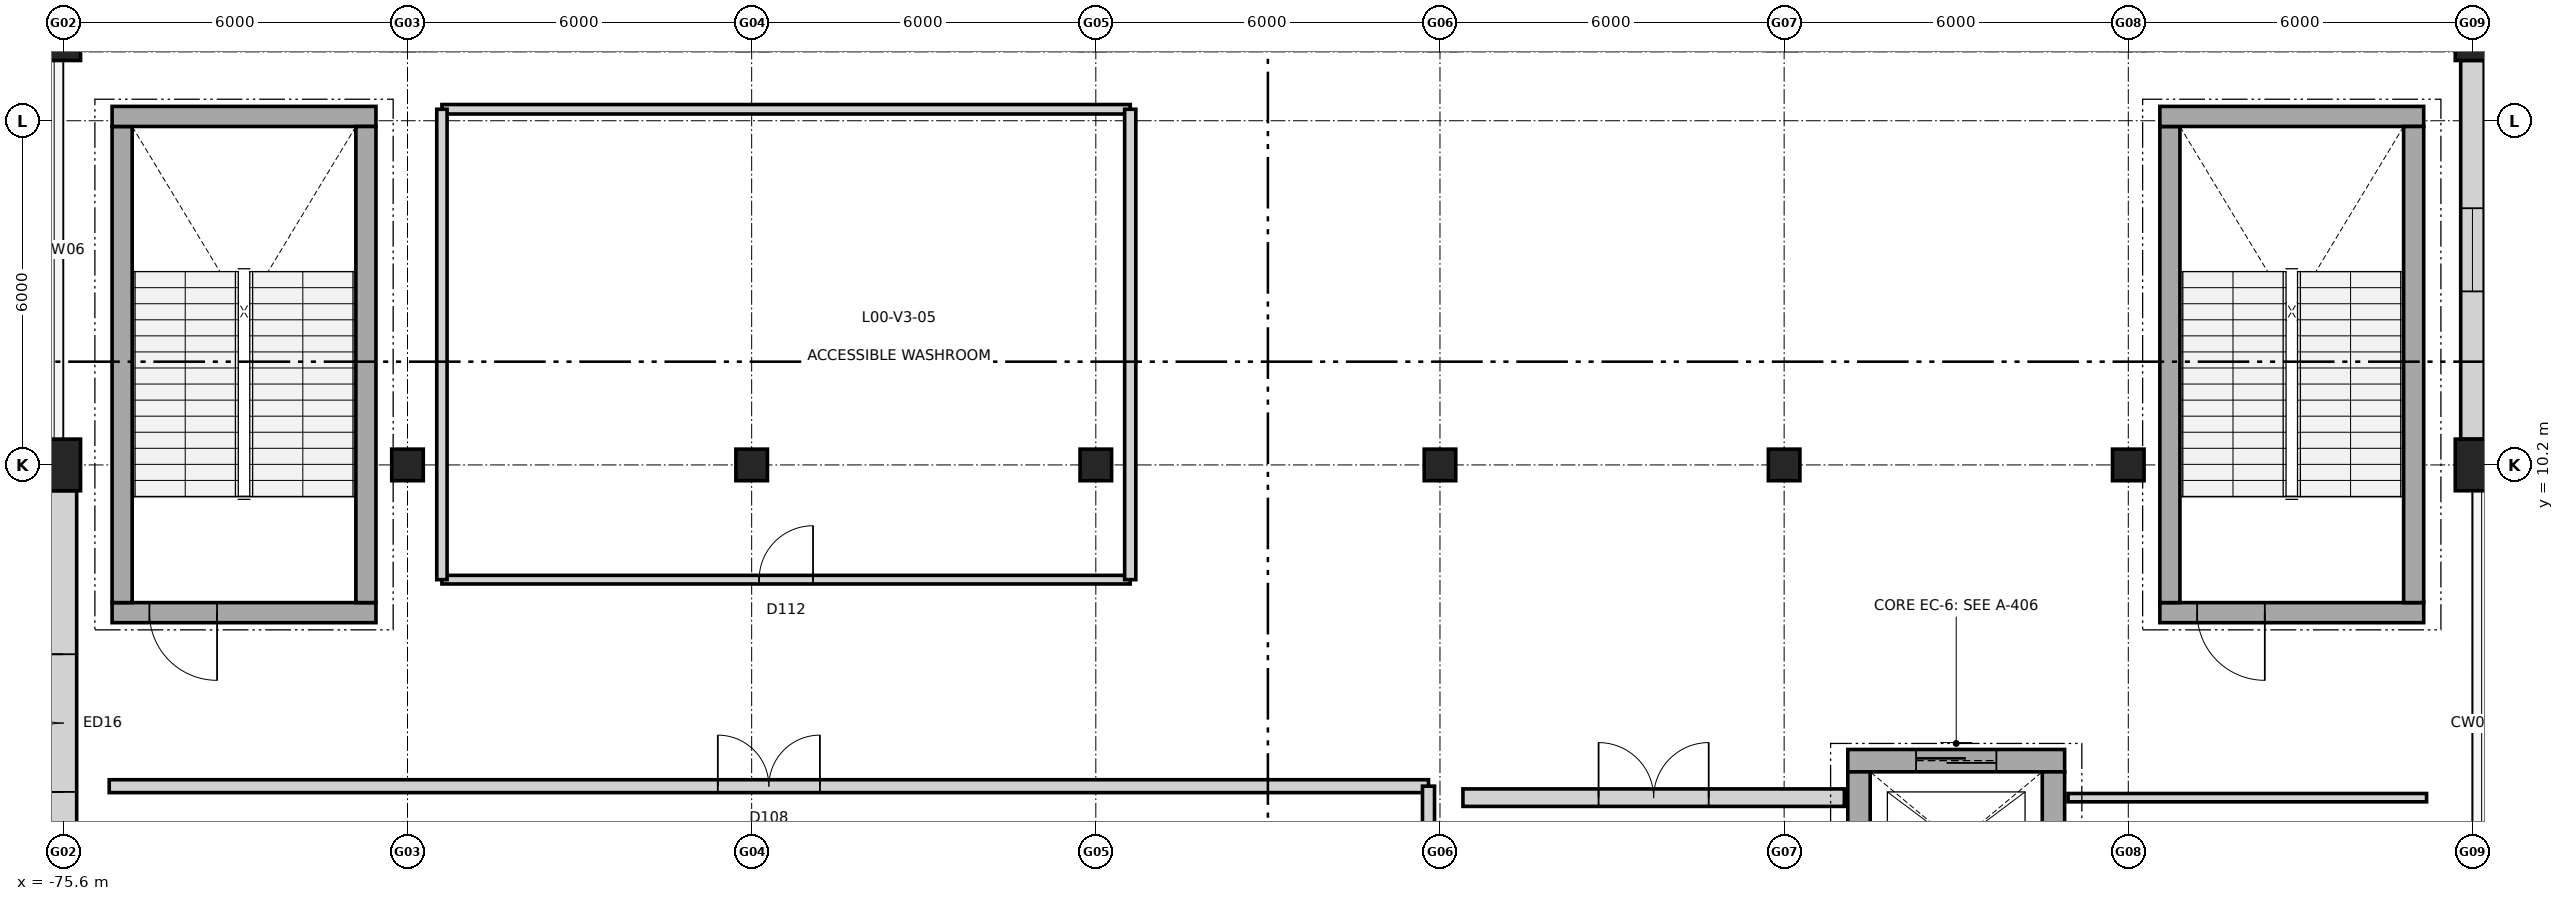
"""IFC4 building model, lengths in metres.
Left out: names, types, materials, properties, quantities, classifications, styles, units other than length and angle.
Written with IfcOpenShell. Run it as: python <this file> out.ifc"""

import sys

from ifc_helpers import new_model, si_unit, direction, frame, frame_2d, origin, origin_2d, place, context, subcontext, project, spatial, rectangle, extrude, element, fill, save


model = new_model("IFC4")
c1 = context("Model", 3, precision=1e-05, world=origin(), true_north=direction((0.0, 1.0)))
c2 = subcontext(c1, "Body", "Model", "MODEL_VIEW")
j1 = project(units=[si_unit("LENGTHUNIT", "METRE"), si_unit("PLANEANGLEUNIT", "RADIAN")], contexts=[c1])
p1 = place(None, origin())
s1 = spatial("IfcSite", under=j1, at=p1, CompositionType="ELEMENT")
p2 = place(p1, origin())
s2 = spatial("IfcBuilding", under=s1, at=p2, CompositionType="ELEMENT")
p3 = place(p2, origin())
s3 = spatial("IfcBuildingStorey", under=s2, at=p3, CompositionType="ELEMENT", Elevation=0.0)
for number, where, z_axis, x_axis in (
    (1, (-75.6, 10.2, 0.0), (0.0, 0.0, 1.0), (1.0, 0.0, 0.0)),
    (2, (-75.6, 17.7, 0.0), (0.0, 0.0, 1.0), (1.0, 0.0, 0.0)),
):
    element("IfcColumn", number, at=place(p3, frame(where, z_axis=z_axis, x_axis=x_axis)), inside=s3, PredefinedType="COLUMN", context=c2, shape_type="SweptSolid", body=[
        extrude(rectangle(XDim=0.6, YDim=0.9, at=origin_2d()), origin(), (0.0, 0.0, 1.0), 5.4),
    ])
for number, where, z_axis, x_axis in (
    (3, (-69.6, 10.2, 0.0), (0.0, 0.0, 1.0), (1.0, 0.0, 0.0)),
    (4, (-63.6, 10.2, 0.0), (0.0, 0.0, 1.0), (1.0, 0.0, 0.0)),
    (5, (-57.6, 10.2, 0.0), (0.0, 0.0, 1.0), (1.0, 0.0, 0.0)),
    (6, (-51.6, 10.2, 0.0), (0.0, 0.0, 1.0), (1.0, 0.0, 0.0)),
    (7, (-45.6, 10.2, 0.0), (0.0, 0.0, 1.0), (1.0, 0.0, 0.0)),
    (8, (-39.6, 10.2, 0.0), (0.0, 0.0, 1.0), (1.0, 0.0, 0.0)),
):
    element("IfcColumn", number, at=place(p3, frame(where, z_axis=z_axis, x_axis=x_axis)), inside=s3, PredefinedType="COLUMN", context=c2, shape_type="SweptSolid", body=[
        extrude(rectangle(XDim=0.55, YDim=0.55, at=origin_2d()), origin(), (0.0, 0.0, 1.0), 5.4),
    ])
for number, where, z_axis, x_axis in (
    (9, (-33.6, 10.2, 0.0), (0.0, 0.0, 1.0), (1.0, 0.0, 0.0)),
    (10, (-33.6, 17.7, 0.0), (0.0, 0.0, 1.0), (1.0, 0.0, 0.0)),
):
    element("IfcColumn", number, at=place(p3, frame(where, z_axis=z_axis, x_axis=x_axis)), inside=s3, PredefinedType="COLUMN", context=c2, shape_type="SweptSolid", body=[
        extrude(rectangle(XDim=0.6, YDim=0.9, at=origin_2d()), origin(), (0.0, 0.0, 1.0), 5.4),
    ])
p4 = place(p3, frame((-75.6, 1.648, 0.0), z_axis=(0.0, 0.0, 1.0), x_axis=(0.0, 1.0, 0.0)))
e11 = element("IfcWall", 11, at=p4, inside=s3, PredefinedType="STANDARD", context=c2, shape_type="SweptSolid", body=[
    extrude(rectangle(XDim=8.104, YDim=0.465, at=frame_2d((4.052, 0.0))), origin(), (0.0, 0.0, 1.0), 4.404),
])
p5 = place(p4, frame((2.852, 0.0, 0.0)))
e12 = element("IfcOpeningElement", 12, at=p5, cuts=e11, PredefinedType="OPENING", context=c2, shape_type="SweptSolid", body=[
    extrude(rectangle(XDim=2.4, YDim=2.5, at=frame_2d((1.2, 1.25))), frame((0.0, 0.242, 0.0), z_axis=(0.0, -1.0, 0.0), x_axis=(1.0, 0.0, 0.0)), (0.0, 0.0, 1.0), 0.485),
])
p6 = place(p3, frame((-33.6, 17.252, 0.0), z_axis=(0.0, 0.0, 1.0), x_axis=(0.0, -1.0, 0.0)))
e13 = element("IfcWall", 13, at=p6, inside=s3, PredefinedType="STANDARD", context=c2, shape_type="SweptSolid", body=[
    extrude(rectangle(XDim=6.604, YDim=0.41, at=frame_2d((3.302, 0.0))), origin(), (0.0, 0.0, 1.0), 4.404),
])
p7 = place(p6, frame((2.577, 0.0, 0.85)))
e14 = element("IfcOpeningElement", 14, at=p7, cuts=e13, PredefinedType="OPENING", context=c2, shape_type="SweptSolid", body=[
    extrude(rectangle(XDim=1.45, YDim=2.1, at=frame_2d((0.725, 1.05))), frame((0.0, 0.215, 0.0), z_axis=(0.0, -1.0, 0.0), x_axis=(1.0, 0.0, 0.0)), (0.0, 0.0, 1.0), 0.43),
])
p8 = place(p3, frame((-70.15, 7.625, 0.0), z_axis=(0.0, 0.0, 1.0), x_axis=(-1.0, 0.0, 0.0)))
e15 = element("IfcWall", 15, at=p8, inside=s3, PredefinedType="SHEAR", context=c2, shape_type="SweptSolid", body=[
    extrude(rectangle(XDim=4.6, YDim=0.35, at=frame_2d((2.3, 0.0))), origin(), (0.0, 0.0, 1.0), 5.4),
])
p9 = place(p8, frame((2.77, 0.0, 0.0)))
e16 = element("IfcOpeningElement", 16, at=p9, cuts=e15, PredefinedType="OPENING", context=c2, shape_type="SweptSolid", body=[
    extrude(rectangle(XDim=1.18, YDim=2.15, at=frame_2d((0.59, 1.075))), frame((0.0, 0.185, 0.0), z_axis=(0.0, -1.0, 0.0), x_axis=(1.0, 0.0, 0.0)), (0.0, 0.0, 1.0), 0.37),
])
p10 = place(p3, frame((-74.575, 7.8, 0.0), z_axis=(0.0, 0.0, 1.0), x_axis=(0.0, 1.0, 0.0)))
e17 = element("IfcWall", 17, at=p10, inside=s3, PredefinedType="SHEAR", context=c2, shape_type="SweptSolid", body=[
    extrude(rectangle(XDim=8.3, YDim=0.35, at=frame_2d((4.15, 0.0))), origin(), (0.0, 0.0, 1.0), 5.4),
])
p11 = place(p3, frame((-74.75, 16.275, 0.0), z_axis=(0.0, 0.0, 1.0), x_axis=(1.0, 0.0, 0.0)))
e18 = element("IfcWall", 18, at=p11, inside=s3, PredefinedType="SHEAR", context=c2, shape_type="SweptSolid", body=[
    extrude(rectangle(XDim=4.6, YDim=0.35, at=frame_2d((2.3, 0.0))), origin(), (0.0, 0.0, 1.0), 5.4),
])
p12 = place(p3, frame((-70.325, 16.1, 0.0), z_axis=(0.0, 0.0, 1.0), x_axis=(0.0, -1.0, 0.0)))
e19 = element("IfcWall", 19, at=p12, inside=s3, PredefinedType="SHEAR", context=c2, shape_type="SweptSolid", body=[
    extrude(rectangle(XDim=8.3, YDim=0.35, at=frame_2d((4.15, 0.0))), origin(), (0.0, 0.0, 1.0), 5.4),
])
p13 = place(p3, frame((-34.45, 7.625, 0.0), z_axis=(0.0, 0.0, 1.0), x_axis=(-1.0, 0.0, 0.0)))
e20 = element("IfcWall", 20, at=p13, inside=s3, PredefinedType="SHEAR", context=c2, shape_type="SweptSolid", body=[
    extrude(rectangle(XDim=4.6, YDim=0.35, at=frame_2d((2.3, 0.0))), origin(), (0.0, 0.0, 1.0), 5.4),
])
p14 = place(p13, frame((2.77, 0.0, 0.0)))
e21 = element("IfcOpeningElement", 21, at=p14, cuts=e20, PredefinedType="OPENING", context=c2, shape_type="SweptSolid", body=[
    extrude(rectangle(XDim=1.18, YDim=2.15, at=frame_2d((0.59, 1.075))), frame((0.0, 0.185, 0.0), z_axis=(0.0, -1.0, 0.0), x_axis=(1.0, 0.0, 0.0)), (0.0, 0.0, 1.0), 0.37),
])
p15 = place(p3, frame((-38.875, 7.8, 0.0), z_axis=(0.0, 0.0, 1.0), x_axis=(0.0, 1.0, 0.0)))
e22 = element("IfcWall", 22, at=p15, inside=s3, PredefinedType="SHEAR", context=c2, shape_type="SweptSolid", body=[
    extrude(rectangle(XDim=8.3, YDim=0.35, at=frame_2d((4.15, 0.0))), origin(), (0.0, 0.0, 1.0), 5.4),
])
p16 = place(p3, frame((-39.05, 16.275, 0.0), z_axis=(0.0, 0.0, 1.0), x_axis=(1.0, 0.0, 0.0)))
e23 = element("IfcWall", 23, at=p16, inside=s3, PredefinedType="SHEAR", context=c2, shape_type="SweptSolid", body=[
    extrude(rectangle(XDim=4.6, YDim=0.35, at=frame_2d((2.3, 0.0))), origin(), (0.0, 0.0, 1.0), 5.4),
])
p17 = place(p3, frame((-34.625, 16.1, 0.0), z_axis=(0.0, 0.0, 1.0), x_axis=(0.0, -1.0, 0.0)))
e24 = element("IfcWall", 24, at=p17, inside=s3, PredefinedType="SHEAR", context=c2, shape_type="SweptSolid", body=[
    extrude(rectangle(XDim=8.3, YDim=0.35, at=frame_2d((4.15, 0.0))), origin(), (0.0, 0.0, 1.0), 5.4),
])
p18 = place(p3, frame((-44.49, 5.045, 0.0), z_axis=(0.0, 0.0, 1.0), x_axis=(1.0, 0.0, 0.0)))
e25 = element("IfcWall", 25, at=p18, inside=s3, PredefinedType="SHEAR", context=c2, shape_type="SweptSolid", body=[
    extrude(rectangle(XDim=3.78, YDim=0.39, at=frame_2d((1.89, 0.0))), origin(), (0.0, 0.0, 1.0), 5.4),
])
p19 = place(p18, frame((1.19, 0.0, 0.0)))
e26 = element("IfcOpeningElement", 26, at=p19, cuts=e25, PredefinedType="OPENING", context=c2, shape_type="SweptSolid", body=[
    extrude(rectangle(XDim=1.4, YDim=2.2, at=frame_2d((0.7, 1.1))), frame((0.0, 0.205, 0.0), z_axis=(0.0, -1.0, 0.0), x_axis=(1.0, 0.0, 0.0)), (0.0, 0.0, 1.0), 0.41),
])
for number, where, z_axis, x_axis in (
    (27, (-44.295, 2.35, 0.0), (0.0, 0.0, 1.0), (0.0, 1.0, 0.0)),
    (28, (-40.905, 4.85, 0.0), (0.0, 0.0, 1.0), (0.0, -1.0, 0.0)),
):
    element("IfcWall", number, at=place(p3, frame(where, z_axis=z_axis, x_axis=x_axis)), inside=s3, PredefinedType="SHEAR", context=c2, shape_type="SweptSolid", body=[
        extrude(rectangle(XDim=2.5, YDim=0.39, at=frame_2d((1.25, 0.0))), origin(), (0.0, 0.0, 1.0), 5.4),
    ])
p20 = place(p3, frame((-74.8, 4.6, 0.0), z_axis=(0.0, 0.0, 1.0), x_axis=(1.0, 0.0, 0.0)))
e29 = element("IfcWall", 29, at=p20, inside=s3, PredefinedType="PARTITIONING", context=c2, shape_type="SweptSolid", body=[
    extrude(rectangle(XDim=23.0, YDim=0.225, at=frame_2d((11.5, 0.0))), origin(), (0.0, 0.0, 1.0), 5.02),
])
p21 = place(p20, frame((10.61, 0.0, 0.0)))
e30 = element("IfcOpeningElement", 30, at=p21, cuts=e29, PredefinedType="OPENING", context=c2, shape_type="SweptSolid", body=[
    extrude(rectangle(XDim=1.78, YDim=2.3, at=frame_2d((0.89, 1.15))), frame((0.0, 0.123, 0.0), z_axis=(0.0, -1.0, 0.0), x_axis=(1.0, 0.0, 0.0)), (0.0, 0.0, 1.0), 0.245),
])
p22 = place(p3, frame((-51.8, -16.0, 0.0), z_axis=(0.0, 0.0, 1.0), x_axis=(0.0, 1.0, 0.0)))
e31 = element("IfcWall", 31, at=p22, inside=s3, PredefinedType="PARTITIONING", context=c2, shape_type="SweptSolid", body=[
    extrude(rectangle(XDim=20.6, YDim=0.21, at=frame_2d((10.3, 0.0))), origin(), (0.0, 0.0, 1.0), 4.165),
])
p23 = place(p3, frame((-51.2, 4.4, 0.0), z_axis=(0.0, 0.0, 1.0), x_axis=(1.0, 0.0, 0.0)))
e32 = element("IfcWall", 32, at=p23, inside=s3, PredefinedType="PARTITIONING", context=c2, shape_type="SweptSolid", body=[
    extrude(rectangle(XDim=6.65, YDim=0.305, at=frame_2d((3.325, 0.0))), origin(), (0.0, 0.0, 1.0), 5.02),
])
p24 = place(p23, frame((2.365, 0.0, 0.0)))
e33 = element("IfcOpeningElement", 33, at=p24, cuts=e32, PredefinedType="OPENING", context=c2, shape_type="SweptSolid", body=[
    extrude(rectangle(XDim=1.92, YDim=2.4, at=frame_2d((0.96, 1.2))), frame((0.0, 0.162, 0.0), z_axis=(0.0, -1.0, 0.0), x_axis=(1.0, 0.0, 0.0)), (0.0, 0.0, 1.0), 0.325),
])
p25 = place(p3, frame((-40.65, 4.4, 0.0), z_axis=(0.0, 0.0, 1.0), x_axis=(1.0, 0.0, 0.0)))
e34 = element("IfcWall", 34, at=p25, inside=s3, PredefinedType="PARTITIONING", context=c2, shape_type="SweptSolid", body=[
    extrude(rectangle(XDim=6.25, YDim=0.145, at=frame_2d((3.125, 0.0))), origin(), (0.0, 0.0, 1.0), 5.02),
])
p26 = place(p3, frame((-69.0, 8.2, 0.0), z_axis=(0.0, 0.0, 1.0), x_axis=(1.0, 0.0, 0.0)))
e35 = element("IfcWall", 35, at=p26, inside=s3, PredefinedType="PARTITIONING", context=c2, shape_type="SweptSolid", body=[
    extrude(rectangle(XDim=12.0, YDim=0.15, at=frame_2d((6.0, 0.0))), origin(), (0.0, 0.0, 1.0), 5.02),
])
p27 = place(p26, frame((5.53, 0.0, 0.0)))
e36 = element("IfcOpeningElement", 36, at=p27, cuts=e35, PredefinedType="OPENING", context=c2, shape_type="SweptSolid", body=[
    extrude(rectangle(XDim=0.94, YDim=2.1, at=frame_2d((0.47, 1.05))), frame((0.0, 0.085, 0.0), z_axis=(0.0, -1.0, 0.0), x_axis=(1.0, 0.0, 0.0)), (0.0, 0.0, 1.0), 0.17),
])
p28 = place(p3, frame((-69.0, 16.4, 0.0), z_axis=(0.0, 0.0, 1.0), x_axis=(1.0, 0.0, 0.0)))
e37 = element("IfcWall", 37, at=p28, inside=s3, PredefinedType="PARTITIONING", context=c2, shape_type="SweptSolid", body=[
    extrude(rectangle(XDim=12.0, YDim=0.165, at=frame_2d((6.0, 0.0))), origin(), (0.0, 0.0, 1.0), 5.02),
])
p29 = place(p3, frame((-69.0, 8.2, 0.0), z_axis=(0.0, 0.0, 1.0), x_axis=(0.0, 1.0, 0.0)))
e38 = element("IfcWall", 38, at=p29, inside=s3, PredefinedType="PARTITIONING", context=c2, shape_type="SweptSolid", body=[
    extrude(rectangle(XDim=8.2, YDim=0.18, at=frame_2d((4.1, 0.0))), origin(), (0.0, 0.0, 1.0), 5.02),
])
p30 = place(p3, frame((-57.0, 8.2, 0.0), z_axis=(0.0, 0.0, 1.0), x_axis=(0.0, 1.0, 0.0)))
e39 = element("IfcWall", 39, at=p30, inside=s3, PredefinedType="PARTITIONING", context=c2, shape_type="SweptSolid", body=[
    extrude(rectangle(XDim=8.2, YDim=0.195, at=frame_2d((4.1, 0.0))), origin(), (0.0, 0.0, 1.0), 5.02),
])
p31 = place(p5, origin())
e40 = element("IfcDoor", 40, at=p31, inside=s3, OperationType="DOUBLE_DOOR_SINGLE_SWING", PredefinedType="DOOR", context=c2, shape_type="SweptSolid", body=[
    extrude(rectangle(XDim=2.4, YDim=2.5, at=frame_2d((1.2, 1.25))), frame((0.0, 0.025, 0.0), z_axis=(0.0, -1.0, 0.0), x_axis=(1.0, 0.0, 0.0)), (0.0, 0.0, 1.0), 0.05),
])
fill(e12, e40)
p32 = place(p7, origin())
e41 = element("IfcWindow", 41, at=p32, inside=s3, PartitioningType="SINGLE_PANEL", PredefinedType="WINDOW", context=c2, shape_type="SweptSolid", body=[
    extrude(rectangle(XDim=1.45, YDim=2.1, at=frame_2d((0.725, 1.05))), frame((0.0, 0.03, 0.0), z_axis=(0.0, -1.0, 0.0), x_axis=(1.0, 0.0, 0.0)), (0.0, 0.0, 1.0), 0.06),
])
fill(e14, e41)
p33 = place(p9, origin())
e42 = element("IfcDoor", 42, at=p33, inside=s3, OperationType="SINGLE_SWING_LEFT", PredefinedType="DOOR", context=c2, shape_type="SweptSolid", body=[
    extrude(rectangle(XDim=1.18, YDim=2.15, at=frame_2d((0.59, 1.075))), frame((0.0, 0.025, 0.0), z_axis=(0.0, -1.0, 0.0), x_axis=(1.0, 0.0, 0.0)), (0.0, 0.0, 1.0), 0.05),
])
fill(e16, e42)
p34 = place(p14, origin())
e43 = element("IfcDoor", 43, at=p34, inside=s3, OperationType="SINGLE_SWING_LEFT", PredefinedType="DOOR", context=c2, shape_type="SweptSolid", body=[
    extrude(rectangle(XDim=1.18, YDim=2.15, at=frame_2d((0.59, 1.075))), frame((0.0, 0.025, 0.0), z_axis=(0.0, -1.0, 0.0), x_axis=(1.0, 0.0, 0.0)), (0.0, 0.0, 1.0), 0.05),
])
fill(e21, e43)
p35 = place(p19, origin())
e44 = element("IfcDoor", 44, at=p35, inside=s3, OperationType="SLIDING_TO_LEFT", PredefinedType="DOOR", context=c2, shape_type="SweptSolid", body=[
    extrude(rectangle(XDim=1.4, YDim=2.2, at=frame_2d((0.7, 1.1))), frame((0.0, 0.025, 0.0), z_axis=(0.0, -1.0, 0.0), x_axis=(1.0, 0.0, 0.0)), (0.0, 0.0, 1.0), 0.05),
])
fill(e26, e44)
p36 = place(p21, origin())
e45 = element("IfcDoor", 45, at=p36, inside=s3, OperationType="DOUBLE_DOOR_SINGLE_SWING", PredefinedType="DOOR", context=c2, shape_type="SweptSolid", body=[
    extrude(rectangle(XDim=1.78, YDim=2.3, at=frame_2d((0.89, 1.15))), frame((0.0, 0.025, 0.0), z_axis=(0.0, -1.0, 0.0), x_axis=(1.0, 0.0, 0.0)), (0.0, 0.0, 1.0), 0.05),
])
fill(e30, e45)
p37 = place(p24, origin())
e46 = element("IfcDoor", 46, at=p37, inside=s3, OperationType="DOUBLE_DOOR_SINGLE_SWING", PredefinedType="DOOR", context=c2, shape_type="SweptSolid", body=[
    extrude(rectangle(XDim=1.92, YDim=2.4, at=frame_2d((0.96, 1.2))), frame((0.0, 0.025, 0.0), z_axis=(0.0, -1.0, 0.0), x_axis=(1.0, 0.0, 0.0)), (0.0, 0.0, 1.0), 0.05),
])
fill(e33, e46)
p38 = place(p27, origin())
e47 = element("IfcDoor", 47, at=p38, inside=s3, OperationType="SINGLE_SWING_RIGHT", PredefinedType="DOOR", context=c2, shape_type="SweptSolid", body=[
    extrude(rectangle(XDim=0.94, YDim=2.1, at=frame_2d((0.47, 1.05))), frame((0.0, 0.025, 0.0), z_axis=(0.0, -1.0, 0.0), x_axis=(1.0, 0.0, 0.0)), (0.0, 0.0, 1.0), 0.05),
])
fill(e36, e47)
save(model, sys.argv[1])
